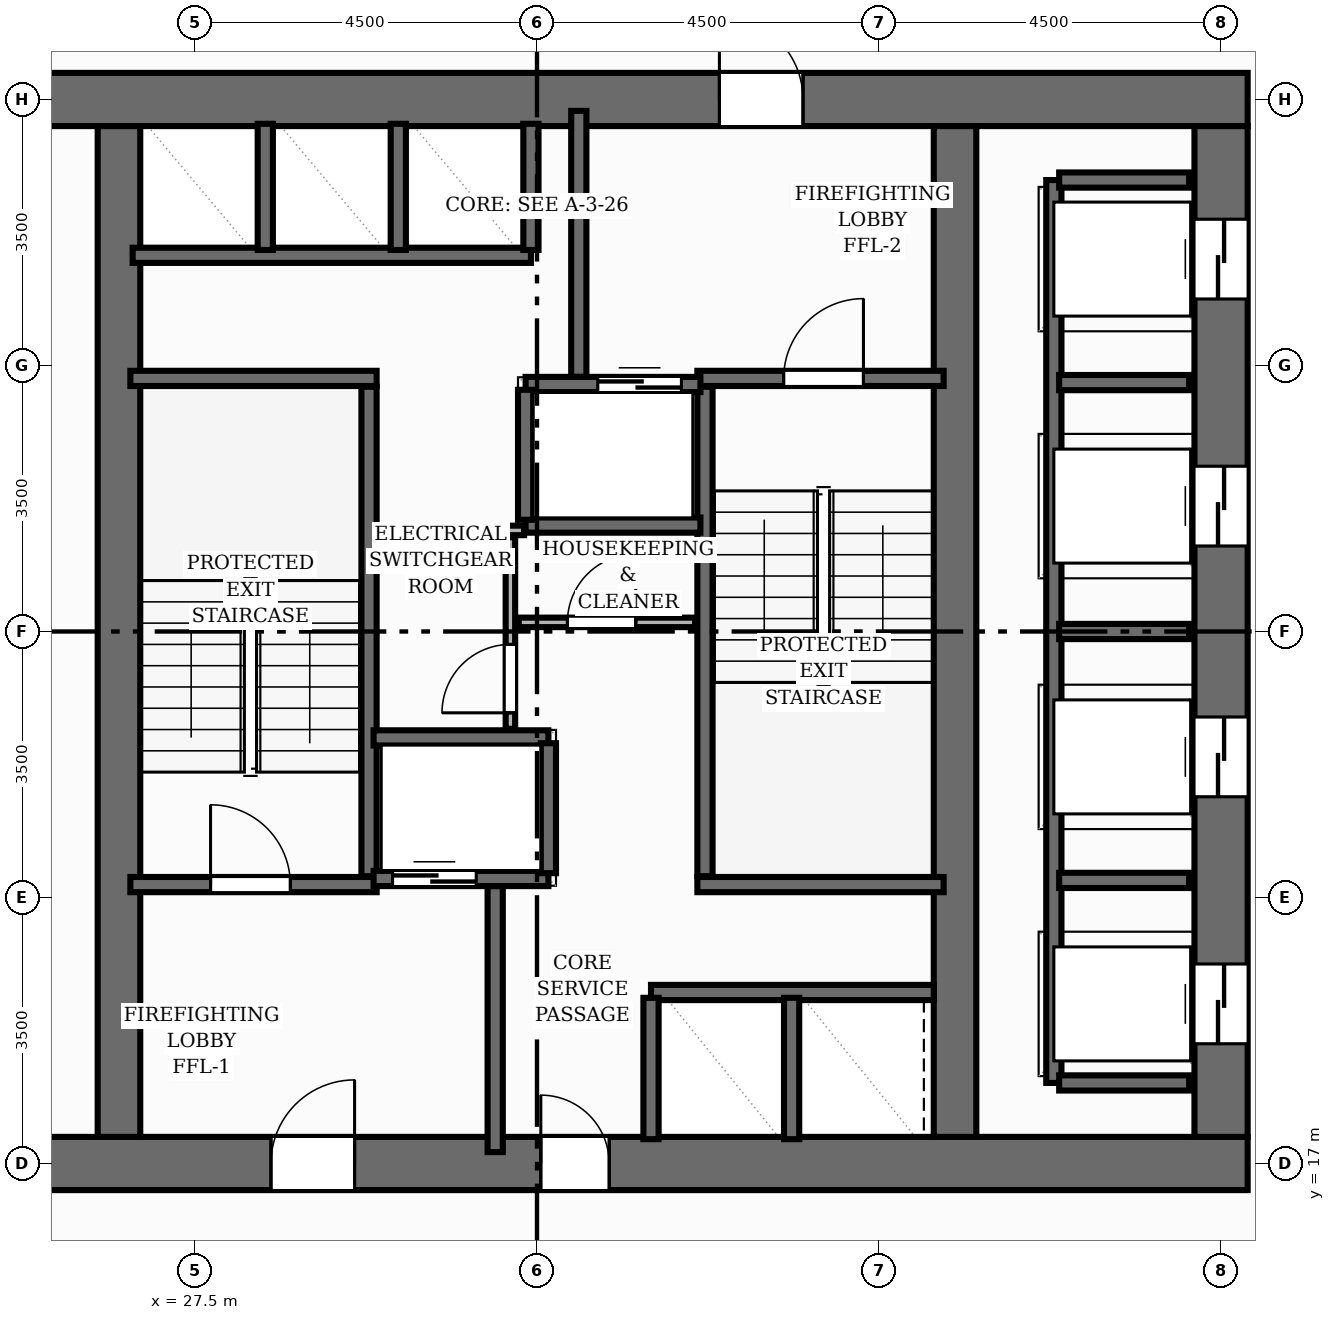
"""IFC4 building model, lengths in metres.
Left out: names, types, materials, properties, quantities, classifications, styles, units other than length and angle.
Written with IfcOpenShell. Run it as: python <this file> out.ifc"""

import sys

from ifc_helpers import new_model, si_unit, direction, frame, frame_2d, origin, place, context, subcontext, project, spatial, rectangle, extrude, element, fill, save


model = new_model("IFC4")
c1 = context("Model", 3, precision=1e-05, world=origin(), true_north=direction((0.0, 1.0)))
c2 = subcontext(c1, "Body", "Model", "MODEL_VIEW")
j1 = project(units=[si_unit("LENGTHUNIT", "METRE"), si_unit("PLANEANGLEUNIT", "RADIAN")], contexts=[c1])
p1 = place(None, origin())
s1 = spatial("IfcSite", under=j1, at=p1, CompositionType="ELEMENT")
p2 = place(p1, origin())
s2 = spatial("IfcBuilding", under=s1, at=p2, CompositionType="ELEMENT")
p3 = place(p2, frame((0.0, 0.0, 106.08)))
s3 = spatial("IfcBuildingStorey", under=s2, at=p3, CompositionType="ELEMENT", Elevation=106.08)
p4 = place(p3, frame((22.65, 17.0, 0.0), z_axis=(0.0, 0.0, 1.0), x_axis=(1.0, 0.0, 0.0)))
e1 = element("IfcWall", 1, at=p4, inside=s3, PredefinedType="SHEAR", context=c2, shape_type="SweptSolid", body=[
    extrude(rectangle(XDim=18.7, YDim=0.7, at=frame_2d((9.35, 0.0))), origin(), (0.0, 0.0, 1.0), 3.2),
])
p5 = place(p4, frame((5.85, 0.0, 0.0)))
e2 = element("IfcOpeningElement", 2, at=p5, cuts=e1, PredefinedType="OPENING", context=c2, shape_type="SweptSolid", body=[
    extrude(rectangle(XDim=1.1, YDim=2.15, at=frame_2d((0.55, 1.075))), frame((0.0, 0.36, 0.0), z_axis=(0.0, -1.0, 0.0), x_axis=(1.0, 0.0, 0.0)), (0.0, 0.0, 1.0), 0.72),
])
p6 = place(p4, frame((9.4, 0.0, 0.0)))
e3 = element("IfcOpeningElement", 3, at=p6, cuts=e1, PredefinedType="OPENING", context=c2, shape_type="SweptSolid", body=[
    extrude(rectangle(XDim=0.9, YDim=2.1, at=frame_2d((0.45, 1.05))), frame((0.0, 0.36, 0.0), z_axis=(0.0, -1.0, 0.0), x_axis=(1.0, 0.0, 0.0)), (0.0, 0.0, 1.0), 0.72),
])
p7 = place(p3, frame((22.65, 31.0, 0.0), z_axis=(0.0, 0.0, 1.0), x_axis=(1.0, 0.0, 0.0)))
e4 = element("IfcWall", 4, at=p7, inside=s3, PredefinedType="SHEAR", context=c2, shape_type="SweptSolid", body=[
    extrude(rectangle(XDim=18.7, YDim=0.7, at=frame_2d((9.35, 0.0))), origin(), (0.0, 0.0, 1.0), 3.2),
])
p8 = place(p7, frame((11.75, 0.0, 0.0)))
e5 = element("IfcOpeningElement", 5, at=p8, cuts=e4, PredefinedType="OPENING", context=c2, shape_type="SweptSolid", body=[
    extrude(rectangle(XDim=1.1, YDim=2.15, at=frame_2d((0.55, 1.075))), frame((0.0, 0.36, 0.0), z_axis=(0.0, -1.0, 0.0), x_axis=(1.0, 0.0, 0.0)), (0.0, 0.0, 1.0), 0.72),
])
p9 = place(p3, frame((41.0, 17.35, 0.0), z_axis=(0.0, 0.0, 1.0), x_axis=(0.0, 1.0, 0.0)))
e6 = element("IfcWall", 6, at=p9, inside=s3, PredefinedType="SHEAR", context=c2, shape_type="SweptSolid", body=[
    extrude(rectangle(XDim=13.3, YDim=0.7, at=frame_2d((6.65, 0.0))), origin(), (0.0, 0.0, 1.0), 3.2),
])
p10 = place(p9, frame((1.225, 0.0, 0.0)))
e7 = element("IfcOpeningElement", 7, at=p10, cuts=e6, PredefinedType="OPENING", context=c2, shape_type="SweptSolid", body=[
    extrude(rectangle(XDim=1.05, YDim=2.15, at=frame_2d((0.525, 1.075))), frame((0.0, 0.36, 0.0), z_axis=(0.0, -1.0, 0.0), x_axis=(1.0, 0.0, 0.0)), (0.0, 0.0, 1.0), 0.72),
])
p11 = place(p9, frame((4.475, 0.0, 0.0)))
e8 = element("IfcOpeningElement", 8, at=p11, cuts=e6, PredefinedType="OPENING", context=c2, shape_type="SweptSolid", body=[
    extrude(rectangle(XDim=1.05, YDim=2.15, at=frame_2d((0.525, 1.075))), frame((0.0, 0.36, 0.0), z_axis=(0.0, -1.0, 0.0), x_axis=(1.0, 0.0, 0.0)), (0.0, 0.0, 1.0), 0.72),
])
p12 = place(p9, frame((7.775, 0.0, 0.0)))
e9 = element("IfcOpeningElement", 9, at=p12, cuts=e6, PredefinedType="OPENING", context=c2, shape_type="SweptSolid", body=[
    extrude(rectangle(XDim=1.05, YDim=2.15, at=frame_2d((0.525, 1.075))), frame((0.0, 0.36, 0.0), z_axis=(0.0, -1.0, 0.0), x_axis=(1.0, 0.0, 0.0)), (0.0, 0.0, 1.0), 0.72),
])
p13 = place(p9, frame((11.025, 0.0, 0.0)))
e10 = element("IfcOpeningElement", 10, at=p13, cuts=e6, PredefinedType="OPENING", context=c2, shape_type="SweptSolid", body=[
    extrude(rectangle(XDim=1.05, YDim=2.15, at=frame_2d((0.525, 1.075))), frame((0.0, 0.36, 0.0), z_axis=(0.0, -1.0, 0.0), x_axis=(1.0, 0.0, 0.0)), (0.0, 0.0, 1.0), 0.72),
])
for number, where, z_axis, x_axis in (
    (11, (26.5, 17.35, 0.0), (0.0, 0.0, 1.0), (0.0, 1.0, 0.0)),
    (12, (37.5, 17.35, 0.0), (0.0, 0.0, 1.0), (0.0, 1.0, 0.0)),
):
    element("IfcWall", number, at=place(p3, frame(where, z_axis=z_axis, x_axis=x_axis)), inside=s3, PredefinedType="SHEAR", context=c2, shape_type="SweptSolid", body=[
        extrude(rectangle(XDim=13.3, YDim=0.56, at=frame_2d((6.65, 0.0))), origin(), (0.0, 0.0, 1.0), 3.2),
    ])
p14 = place(p3, frame((29.79, 20.78, 0.0), z_axis=(0.0, 0.0, 1.0), x_axis=(0.0, 1.0, 0.0)))
e13 = element("IfcWall", 13, at=p14, inside=s3, PredefinedType="SHEAR", context=c2, shape_type="SweptSolid", body=[
    extrude(rectangle(XDim=6.44, YDim=0.2, at=frame_2d((3.22, 0.0))), origin(), (0.0, 0.0, 1.0), 3.2),
])
p15 = place(p3, frame((26.65, 27.33, 0.0), z_axis=(0.0, 0.0, 1.0), x_axis=(1.0, 0.0, 0.0)))
e14 = element("IfcWall", 14, at=p15, inside=s3, PredefinedType="SHEAR", context=c2, shape_type="SweptSolid", body=[
    extrude(rectangle(XDim=3.24, YDim=0.2, at=frame_2d((1.62, 0.0))), origin(), (0.0, 0.0, 1.0), 3.2),
])
p16 = place(p3, frame((26.65, 20.67, 0.0), z_axis=(0.0, 0.0, 1.0), x_axis=(1.0, 0.0, 0.0)))
e15 = element("IfcWall", 15, at=p16, inside=s3, PredefinedType="SHEAR", context=c2, shape_type="SweptSolid", body=[
    extrude(rectangle(XDim=3.24, YDim=0.2, at=frame_2d((1.62, 0.0))), origin(), (0.0, 0.0, 1.0), 3.2),
])
p17 = place(p16, frame((1.055, 0.0, 0.0)))
e16 = element("IfcOpeningElement", 16, at=p17, cuts=e15, PredefinedType="OPENING", context=c2, shape_type="SweptSolid", body=[
    extrude(rectangle(XDim=1.05, YDim=2.15, at=frame_2d((0.525, 1.075))), frame((0.0, 0.11, 0.0), z_axis=(0.0, -1.0, 0.0), x_axis=(1.0, 0.0, 0.0)), (0.0, 0.0, 1.0), 0.22),
])
p18 = place(p3, frame((34.21, 20.78, 0.0), z_axis=(0.0, 0.0, 1.0), x_axis=(0.0, 1.0, 0.0)))
e17 = element("IfcWall", 17, at=p18, inside=s3, PredefinedType="SHEAR", context=c2, shape_type="SweptSolid", body=[
    extrude(rectangle(XDim=6.44, YDim=0.2, at=frame_2d((3.22, 0.0))), origin(), (0.0, 0.0, 1.0), 3.2),
])
p19 = place(p3, frame((34.11, 20.67, 0.0), z_axis=(0.0, 0.0, 1.0), x_axis=(1.0, 0.0, 0.0)))
e18 = element("IfcWall", 18, at=p19, inside=s3, PredefinedType="SHEAR", context=c2, shape_type="SweptSolid", body=[
    extrude(rectangle(XDim=3.24, YDim=0.2, at=frame_2d((1.62, 0.0))), origin(), (0.0, 0.0, 1.0), 3.2),
])
p20 = place(p3, frame((34.11, 27.33, 0.0), z_axis=(0.0, 0.0, 1.0), x_axis=(1.0, 0.0, 0.0)))
e19 = element("IfcWall", 19, at=p20, inside=s3, PredefinedType="SHEAR", context=c2, shape_type="SweptSolid", body=[
    extrude(rectangle(XDim=3.24, YDim=0.2, at=frame_2d((1.62, 0.0))), origin(), (0.0, 0.0, 1.0), 3.2),
])
p21 = place(p20, frame((1.135, 0.0, 0.0)))
e20 = element("IfcOpeningElement", 20, at=p21, cuts=e19, PredefinedType="OPENING", context=c2, shape_type="SweptSolid", body=[
    extrude(rectangle(XDim=1.05, YDim=2.15, at=frame_2d((0.525, 1.075))), frame((0.0, 0.11, 0.0), z_axis=(0.0, -1.0, 0.0), x_axis=(1.0, 0.0, 0.0)), (0.0, 0.0, 1.0), 0.22),
])
for number, where, z_axis, x_axis in (
    (21, (31.45, 17.15, 0.0), (0.0, 0.0, 1.0), (0.0, 1.0, 0.0)),
    (22, (32.55, 27.35, 0.0), (0.0, 0.0, 1.0), (0.0, 1.0, 0.0)),
):
    element("IfcWall", number, at=place(p3, frame(where, z_axis=z_axis, x_axis=x_axis)), inside=s3, PredefinedType="SHEAR", context=c2, shape_type="SweptSolid", body=[
        extrude(rectangle(XDim=3.5, YDim=0.2, at=frame_2d((1.75, 0.0))), origin(), (0.0, 0.0, 1.0), 3.2),
    ])
p22 = place(p3, frame((29.85, 20.75, 0.0), z_axis=(0.0, 0.0, 1.0), x_axis=(1.0, 0.0, 0.0)))
e23 = element("IfcWall", 23, at=p22, inside=s3, PredefinedType="SHEAR", context=c2, shape_type="SweptSolid", body=[
    extrude(rectangle(XDim=2.3, YDim=0.2, at=frame_2d((1.15, 0.0))), origin(), (0.0, 0.0, 1.0), 3.2),
])
p23 = place(p22, frame((0.25, 0.0, 0.0)))
e24 = element("IfcOpeningElement", 24, at=p23, cuts=e23, PredefinedType="OPENING", context=c2, shape_type="SweptSolid", body=[
    extrude(rectangle(XDim=1.1, YDim=2.15, at=frame_2d((0.55, 1.075))), frame((0.0, 0.11, 0.0), z_axis=(0.0, -1.0, 0.0), x_axis=(1.0, 0.0, 0.0)), (0.0, 0.0, 1.0), 0.22),
])
p24 = place(p3, frame((29.85, 22.6, 0.0), z_axis=(0.0, 0.0, 1.0), x_axis=(1.0, 0.0, 0.0)))
e25 = element("IfcWall", 25, at=p24, inside=s3, PredefinedType="SHEAR", context=c2, shape_type="SweptSolid", body=[
    extrude(rectangle(XDim=2.3, YDim=0.2, at=frame_2d((1.15, 0.0))), origin(), (0.0, 0.0, 1.0), 3.2),
])
p25 = place(p3, frame((32.15, 20.82, 0.0), z_axis=(0.0, 0.0, 1.0), x_axis=(0.0, 1.0, 0.0)))
e26 = element("IfcWall", 26, at=p25, inside=s3, PredefinedType="SHEAR", context=c2, shape_type="SweptSolid", body=[
    extrude(rectangle(XDim=1.71, YDim=0.2, at=frame_2d((0.855, 0.0))), origin(), (0.0, 0.0, 1.0), 3.2),
])
p26 = place(p3, frame((31.85, 27.25, 0.0), z_axis=(0.0, 0.0, 1.0), x_axis=(1.0, 0.0, 0.0)))
e27 = element("IfcWall", 27, at=p26, inside=s3, PredefinedType="SHEAR", context=c2, shape_type="SweptSolid", body=[
    extrude(rectangle(XDim=2.3, YDim=0.2, at=frame_2d((1.15, 0.0))), origin(), (0.0, 0.0, 1.0), 3.2),
])
p27 = place(p26, frame((0.95, 0.0, 0.0)))
e28 = element("IfcOpeningElement", 28, at=p27, cuts=e27, PredefinedType="OPENING", context=c2, shape_type="SweptSolid", body=[
    extrude(rectangle(XDim=1.1, YDim=2.15, at=frame_2d((0.55, 1.075))), frame((0.0, 0.11, 0.0), z_axis=(0.0, -1.0, 0.0), x_axis=(1.0, 0.0, 0.0)), (0.0, 0.0, 1.0), 0.22),
])
p28 = place(p3, frame((31.85, 25.4, 0.0), z_axis=(0.0, 0.0, 1.0), x_axis=(1.0, 0.0, 0.0)))
e29 = element("IfcWall", 29, at=p28, inside=s3, PredefinedType="SHEAR", context=c2, shape_type="SweptSolid", body=[
    extrude(rectangle(XDim=2.3, YDim=0.2, at=frame_2d((1.15, 0.0))), origin(), (0.0, 0.0, 1.0), 3.2),
])
p29 = place(p3, frame((31.85, 25.47, 0.0), z_axis=(0.0, 0.0, 1.0), x_axis=(0.0, 1.0, 0.0)))
e30 = element("IfcWall", 30, at=p29, inside=s3, PredefinedType="SHEAR", context=c2, shape_type="SweptSolid", body=[
    extrude(rectangle(XDim=1.71, YDim=0.2, at=frame_2d((0.855, 0.0))), origin(), (0.0, 0.0, 1.0), 3.2),
])
p30 = place(p3, frame((38.8, 18.06, 0.0), z_axis=(0.0, 0.0, 1.0), x_axis=(0.0, 1.0, 0.0)))
e31 = element("IfcWall", 31, at=p30, inside=s3, PredefinedType="SHEAR", context=c2, shape_type="SweptSolid", body=[
    extrude(rectangle(XDim=11.88, YDim=0.2, at=frame_2d((5.94, 0.0))), origin(), (0.0, 0.0, 1.0), 3.2),
])
for number, where, z_axis, x_axis in (
    (32, (38.87, 18.06, 0.0), (0.0, 0.0, 1.0), (1.0, 0.0, 0.0)),
    (33, (38.87, 29.94, 0.0), (0.0, 0.0, 1.0), (1.0, 0.0, 0.0)),
    (34, (38.87, 20.725, 0.0), (0.0, 0.0, 1.0), (1.0, 0.0, 0.0)),
    (35, (38.87, 24.0, 0.0), (0.0, 0.0, 1.0), (1.0, 0.0, 0.0)),
    (36, (38.87, 27.275, 0.0), (0.0, 0.0, 1.0), (1.0, 0.0, 0.0)),
):
    element("IfcWall", number, at=place(p3, frame(where, z_axis=z_axis, x_axis=x_axis)), inside=s3, PredefinedType="SHEAR", context=c2, shape_type="SweptSolid", body=[
        extrude(rectangle(XDim=1.71, YDim=0.2, at=frame_2d((0.855, 0.0))), origin(), (0.0, 0.0, 1.0), 3.2),
    ])
p31 = place(p3, frame((26.68, 28.95, 0.0), z_axis=(0.0, 0.0, 1.0), x_axis=(1.0, 0.0, 0.0)))
e37 = element("IfcWall", 37, at=p31, inside=s3, PredefinedType="SHEAR", context=c2, shape_type="SweptSolid", body=[
    extrude(rectangle(XDim=5.24, YDim=0.2, at=frame_2d((2.62, 0.0))), origin(), (0.0, 0.0, 1.0), 3.2),
])
for number, where, z_axis, x_axis in (
    (38, (31.92, 29.02, 0.0), (0.0, 0.0, 1.0), (0.0, 1.0, 0.0)),
    (39, (28.425, 29.02, 0.0), (0.0, 0.0, 1.0), (0.0, 1.0, 0.0)),
    (40, (30.175, 29.02, 0.0), (0.0, 0.0, 1.0), (0.0, 1.0, 0.0)),
):
    element("IfcWall", number, at=place(p3, frame(where, z_axis=z_axis, x_axis=x_axis)), inside=s3, PredefinedType="SHEAR", context=c2, shape_type="SweptSolid", body=[
        extrude(rectangle(XDim=1.66, YDim=0.2, at=frame_2d((0.83, 0.0))), origin(), (0.0, 0.0, 1.0), 3.2),
    ])
p32 = place(p3, frame((33.5, 19.25, 0.0), z_axis=(0.0, 0.0, 1.0), x_axis=(1.0, 0.0, 0.0)))
e41 = element("IfcWall", 41, at=p32, inside=s3, PredefinedType="SHEAR", context=c2, shape_type="SweptSolid", body=[
    extrude(rectangle(XDim=3.72, YDim=0.2, at=frame_2d((1.86, 0.0))), origin(), (0.0, 0.0, 1.0), 3.2),
])
for number, where, z_axis, x_axis in (
    (42, (33.5, 17.32, 0.0), (0.0, 0.0, 1.0), (0.0, 1.0, 0.0)),
    (43, (35.35, 17.32, 0.0), (0.0, 0.0, 1.0), (0.0, 1.0, 0.0)),
):
    element("IfcWall", number, at=place(p3, frame(where, z_axis=z_axis, x_axis=x_axis)), inside=s3, PredefinedType="SHEAR", context=c2, shape_type="SweptSolid", body=[
        extrude(rectangle(XDim=1.86, YDim=0.2, at=frame_2d((0.93, 0.0))), origin(), (0.0, 0.0, 1.0), 3.2),
    ])
p33 = place(p3, frame((31.65, 22.72, 0.0), z_axis=(0.0, 0.0, 1.0), x_axis=(0.0, 1.0, 0.0)))
e44 = element("IfcWall", 44, at=p33, inside=s3, PredefinedType="PARTITIONING", context=c2, shape_type="SweptSolid", body=[
    extrude(rectangle(XDim=2.52, YDim=0.125, at=frame_2d((1.26, 0.0))), origin(), (0.0, 0.0, 1.0), 2.955),
])
p34 = place(p33, frame((0.21, 0.0, 0.0)))
e45 = element("IfcOpeningElement", 45, at=p34, cuts=e44, PredefinedType="OPENING", context=c2, shape_type="SweptSolid", body=[
    extrude(rectangle(XDim=0.9, YDim=2.1, at=frame_2d((0.45, 1.05))), frame((0.0, 0.073, 0.0), z_axis=(0.0, -1.0, 0.0), x_axis=(1.0, 0.0, 0.0)), (0.0, 0.0, 1.0), 0.145),
])
p35 = place(p3, frame((31.76, 24.12, 0.0), z_axis=(0.0, 0.0, 1.0), x_axis=(1.0, 0.0, 0.0)))
e46 = element("IfcWall", 46, at=p35, inside=s3, PredefinedType="PARTITIONING", context=c2, shape_type="SweptSolid", body=[
    extrude(rectangle(XDim=2.32, YDim=0.125, at=frame_2d((1.16, 0.0))), origin(), (0.0, 0.0, 1.0), 2.955),
])
p36 = place(p35, frame((0.64, 0.0, 0.0)))
e47 = element("IfcOpeningElement", 47, at=p36, cuts=e46, PredefinedType="OPENING", context=c2, shape_type="SweptSolid", body=[
    extrude(rectangle(XDim=0.9, YDim=2.1, at=frame_2d((0.45, 1.05))), frame((0.0, 0.073, 0.0), z_axis=(0.0, -1.0, 0.0), x_axis=(1.0, 0.0, 0.0)), (0.0, 0.0, 1.0), 0.145),
])
p37 = place(p3, frame((29.89, 25.33, 0.0), z_axis=(0.0, 0.0, 1.0), x_axis=(1.0, 0.0, 0.0)))
e48 = element("IfcWall", 48, at=p37, inside=s3, PredefinedType="PARTITIONING", context=c2, shape_type="SweptSolid", body=[
    extrude(rectangle(XDim=1.94, YDim=0.125, at=frame_2d((0.97, 0.0))), origin(), (0.0, 0.0, 1.0), 2.955),
])
p38 = place(p17, origin())
e49 = element("IfcDoor", 49, at=p38, inside=s3, OperationType="SINGLE_SWING_LEFT", PredefinedType="DOOR", context=c2, shape_type="SweptSolid", body=[
    extrude(rectangle(XDim=1.05, YDim=2.15, at=frame_2d((0.525, 1.075))), frame((0.0, 0.025, 0.0), z_axis=(0.0, -1.0, 0.0), x_axis=(1.0, 0.0, 0.0)), (0.0, 0.0, 1.0), 0.05),
])
fill(e16, e49)
p39 = place(p21, origin())
e50 = element("IfcDoor", 50, at=p39, inside=s3, OperationType="SINGLE_SWING_RIGHT", PredefinedType="DOOR", context=c2, shape_type="SweptSolid", body=[
    extrude(rectangle(XDim=1.05, YDim=2.15, at=frame_2d((0.525, 1.075))), frame((0.0, 0.025, 0.0), z_axis=(0.0, -1.0, 0.0), x_axis=(1.0, 0.0, 0.0)), (0.0, 0.0, 1.0), 0.05),
])
fill(e20, e50)
p40 = place(p5, origin())
e51 = element("IfcDoor", 51, at=p40, inside=s3, OperationType="SINGLE_SWING_RIGHT", PredefinedType="DOOR", context=c2, shape_type="SweptSolid", body=[
    extrude(rectangle(XDim=1.1, YDim=2.15, at=frame_2d((0.55, 1.075))), frame((0.0, 0.025, 0.0), z_axis=(0.0, -1.0, 0.0), x_axis=(1.0, 0.0, 0.0)), (0.0, 0.0, 1.0), 0.05),
])
fill(e2, e51)
p41 = place(p8, origin())
e52 = element("IfcDoor", 52, at=p41, inside=s3, OperationType="SINGLE_SWING_LEFT", PredefinedType="DOOR", context=c2, shape_type="SweptSolid", body=[
    extrude(rectangle(XDim=1.1, YDim=2.15, at=frame_2d((0.55, 1.075))), frame((0.0, 0.025, 0.0), z_axis=(0.0, -1.0, 0.0), x_axis=(1.0, 0.0, 0.0)), (0.0, 0.0, 1.0), 0.05),
])
fill(e5, e52)
p42 = place(p23, origin())
e53 = element("IfcDoor", 53, at=p42, inside=s3, OperationType="DOUBLE_DOOR_SLIDING", PredefinedType="DOOR", context=c2, shape_type="SweptSolid", body=[
    extrude(rectangle(XDim=1.1, YDim=2.15, at=frame_2d((0.55, 1.075))), frame((0.0, 0.025, 0.0), z_axis=(0.0, -1.0, 0.0), x_axis=(1.0, 0.0, 0.0)), (0.0, 0.0, 1.0), 0.05),
])
fill(e24, e53)
p43 = place(p27, origin())
e54 = element("IfcDoor", 54, at=p43, inside=s3, OperationType="DOUBLE_DOOR_SLIDING", PredefinedType="DOOR", context=c2, shape_type="SweptSolid", body=[
    extrude(rectangle(XDim=1.1, YDim=2.15, at=frame_2d((0.55, 1.075))), frame((0.0, 0.025, 0.0), z_axis=(0.0, -1.0, 0.0), x_axis=(1.0, 0.0, 0.0)), (0.0, 0.0, 1.0), 0.05),
])
fill(e28, e54)
p44 = place(p10, origin())
e55 = element("IfcDoor", 55, at=p44, inside=s3, OperationType="DOUBLE_DOOR_SLIDING", PredefinedType="DOOR", context=c2, shape_type="SweptSolid", body=[
    extrude(rectangle(XDim=1.05, YDim=2.15, at=frame_2d((0.525, 1.075))), frame((0.0, 0.025, 0.0), z_axis=(0.0, -1.0, 0.0), x_axis=(1.0, 0.0, 0.0)), (0.0, 0.0, 1.0), 0.05),
])
fill(e7, e55)
p45 = place(p11, origin())
e56 = element("IfcDoor", 56, at=p45, inside=s3, OperationType="DOUBLE_DOOR_SLIDING", PredefinedType="DOOR", context=c2, shape_type="SweptSolid", body=[
    extrude(rectangle(XDim=1.05, YDim=2.15, at=frame_2d((0.525, 1.075))), frame((0.0, 0.025, 0.0), z_axis=(0.0, -1.0, 0.0), x_axis=(1.0, 0.0, 0.0)), (0.0, 0.0, 1.0), 0.05),
])
fill(e8, e56)
p46 = place(p12, origin())
e57 = element("IfcDoor", 57, at=p46, inside=s3, OperationType="DOUBLE_DOOR_SLIDING", PredefinedType="DOOR", context=c2, shape_type="SweptSolid", body=[
    extrude(rectangle(XDim=1.05, YDim=2.15, at=frame_2d((0.525, 1.075))), frame((0.0, 0.025, 0.0), z_axis=(0.0, -1.0, 0.0), x_axis=(1.0, 0.0, 0.0)), (0.0, 0.0, 1.0), 0.05),
])
fill(e9, e57)
p47 = place(p13, origin())
e58 = element("IfcDoor", 58, at=p47, inside=s3, OperationType="DOUBLE_DOOR_SLIDING", PredefinedType="DOOR", context=c2, shape_type="SweptSolid", body=[
    extrude(rectangle(XDim=1.05, YDim=2.15, at=frame_2d((0.525, 1.075))), frame((0.0, 0.025, 0.0), z_axis=(0.0, -1.0, 0.0), x_axis=(1.0, 0.0, 0.0)), (0.0, 0.0, 1.0), 0.05),
])
fill(e10, e58)
p48 = place(p6, origin())
e59 = element("IfcDoor", 59, at=p48, inside=s3, OperationType="SINGLE_SWING_LEFT", PredefinedType="DOOR", context=c2, shape_type="SweptSolid", body=[
    extrude(rectangle(XDim=0.9, YDim=2.1, at=frame_2d((0.45, 1.05))), frame((0.0, 0.025, 0.0), z_axis=(0.0, -1.0, 0.0), x_axis=(1.0, 0.0, 0.0)), (0.0, 0.0, 1.0), 0.05),
])
fill(e3, e59)
p49 = place(p34, origin())
e60 = element("IfcDoor", 60, at=p49, inside=s3, OperationType="SINGLE_SWING_LEFT", PredefinedType="DOOR", context=c2, shape_type="SweptSolid", body=[
    extrude(rectangle(XDim=0.9, YDim=2.1, at=frame_2d((0.45, 1.05))), frame((0.0, 0.025, 0.0), z_axis=(0.0, -1.0, 0.0), x_axis=(1.0, 0.0, 0.0)), (0.0, 0.0, 1.0), 0.05),
])
fill(e45, e60)
p50 = place(p36, origin())
e61 = element("IfcDoor", 61, at=p50, inside=s3, OperationType="SINGLE_SWING_RIGHT", PredefinedType="DOOR", context=c2, shape_type="SweptSolid", body=[
    extrude(rectangle(XDim=0.9, YDim=2.1, at=frame_2d((0.45, 1.05))), frame((0.0, 0.025, 0.0), z_axis=(0.0, -1.0, 0.0), x_axis=(1.0, 0.0, 0.0)), (0.0, 0.0, 1.0), 0.05),
])
fill(e47, e61)
save(model, sys.argv[1])
